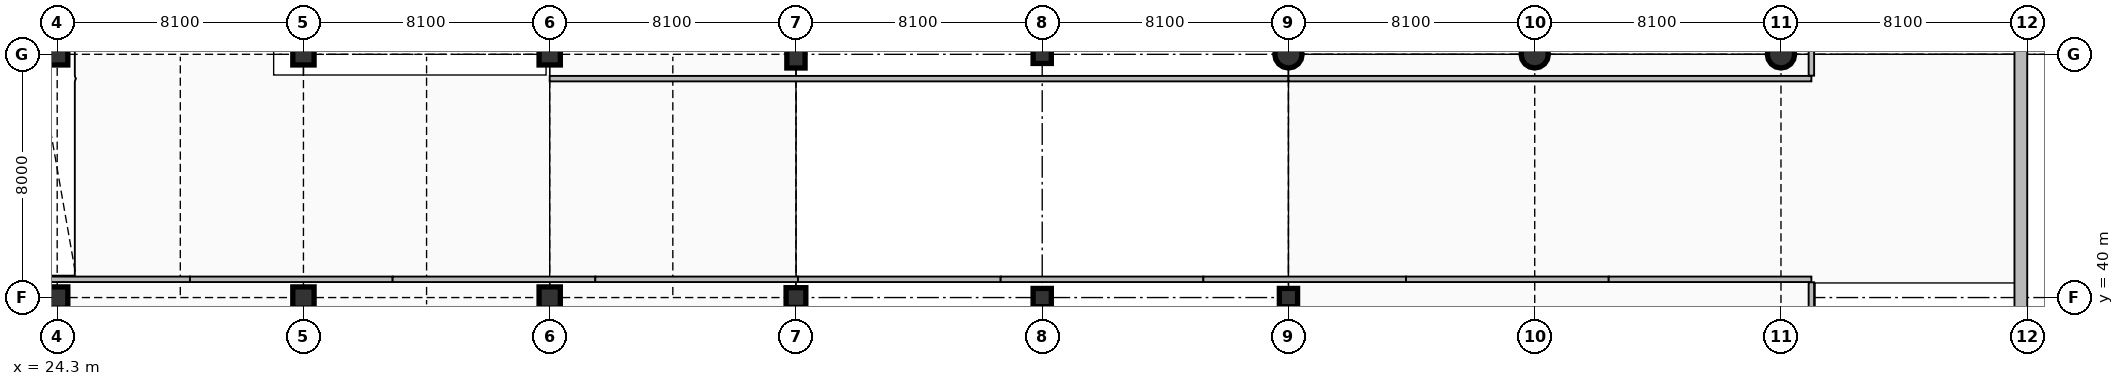
"""IFC4 building model, lengths in metres.
Left out: names, types, materials, properties, quantities, classifications, styles, units other than length and angle.
Written with IfcOpenShell. Run it as: python <this file> out.ifc"""

import sys

from ifc_helpers import new_model, si_unit, direction, frame, frame_2d, origin, origin_2d, place, context, subcontext, project, spatial, rectangle, circle, extrude, element, fill, save


model = new_model("IFC4")
c1 = context("Model", 3, precision=1e-05, world=origin(), true_north=direction((0.0, 1.0)))
c2 = subcontext(c1, "Body", "Model", "MODEL_VIEW")
j1 = project(units=[si_unit("LENGTHUNIT", "METRE"), si_unit("PLANEANGLEUNIT", "RADIAN")], contexts=[c1])
p1 = place(None, origin())
s1 = spatial("IfcSite", under=j1, at=p1, CompositionType="ELEMENT")
p2 = place(p1, origin())
s2 = spatial("IfcBuilding", under=s1, at=p2, CompositionType="ELEMENT")
p3 = place(p2, frame((0.0, 0.0, -4.8)))
s3 = spatial("IfcBuildingStorey", under=s2, at=p3, CompositionType="ELEMENT", Elevation=-4.8)
p4 = place(p3, frame((88.89, 56.0, 0.0), z_axis=(0.0, 0.0, 1.0), x_axis=(0.0, -1.0, 0.0)))
e1 = element("IfcWall", 1, at=p4, inside=s3, PredefinedType="USERDEFINED", context=c2, shape_type="SweptSolid", body=[
    extrude(rectangle(XDim=31.79, YDim=0.42, at=frame_2d((15.895, 0.0))), origin(), (0.0, 0.0, 1.0), 4.45),
])
for number, where, z_axis, x_axis in (
    (2, (24.3, 40.0, 0.0), (0.0, 0.0, 1.0), (1.0, 0.0, 0.0)),
    (3, (24.3, 48.0, 0.0), (0.0, 0.0, 1.0), (1.0, 0.0, 0.0)),
    (4, (32.4, 40.0, 0.0), (0.0, 0.0, 1.0), (1.0, 0.0, 0.0)),
    (5, (32.4, 48.0, 0.0), (0.0, 0.0, 1.0), (1.0, 0.0, 0.0)),
    (6, (40.5, 40.0, 0.0), (0.0, 0.0, 1.0), (1.0, 0.0, 0.0)),
    (7, (40.5, 48.0, 0.0), (0.0, 0.0, 1.0), (1.0, 0.0, 0.0)),
):
    element("IfcColumn", number, at=place(p3, frame(where, z_axis=z_axis, x_axis=x_axis)), inside=s3, PredefinedType="COLUMN", context=c2, shape_type="SweptSolid", body=[
        extrude(rectangle(XDim=0.7, YDim=0.7, at=origin_2d()), origin(), (0.0, 0.0, 1.0), 4.8),
    ])
p5 = place(p3, frame((48.6, 40.0, 0.0), z_axis=(0.0, 0.0, 1.0), x_axis=(1.0, 0.0, 0.0)))
e8 = element("IfcColumn", 8, at=p5, inside=s3, PredefinedType="COLUMN", context=c2, shape_type="SweptSolid", body=[
    extrude(rectangle(XDim=0.65, YDim=0.65, at=origin_2d()), origin(), (0.0, 0.0, 1.0), 4.8),
])
p6 = place(p3, frame((48.6, 48.0, 0.0), z_axis=(0.0, 0.0, 1.0), x_axis=(1.0, 0.0, 0.0)))
e9 = element("IfcColumn", 9, at=p6, inside=s3, PredefinedType="COLUMN", context=c2, shape_type="SweptSolid", body=[
    extrude(rectangle(XDim=0.6, YDim=0.9, at=origin_2d()), origin(), (0.0, 0.0, 1.0), 4.8),
])
for number, where, z_axis, x_axis in (
    (10, (56.7, 40.0, 0.0), (0.0, 0.0, 1.0), (1.0, 0.0, 0.0)),
    (11, (56.7, 48.0, 0.0), (0.0, 0.0, 1.0), (1.0, 0.0, 0.0)),
):
    element("IfcColumn", number, at=place(p3, frame(where, z_axis=z_axis, x_axis=x_axis)), inside=s3, PredefinedType="COLUMN", context=c2, shape_type="SweptSolid", body=[
        extrude(rectangle(XDim=0.6, YDim=0.6, at=origin_2d()), origin(), (0.0, 0.0, 1.0), 4.45),
    ])
p7 = place(p3, frame((64.8, 40.0, 0.0), z_axis=(0.0, 0.0, 1.0), x_axis=(1.0, 0.0, 0.0)))
e12 = element("IfcColumn", 12, at=p7, inside=s3, PredefinedType="COLUMN", context=c2, shape_type="SweptSolid", body=[
    extrude(rectangle(XDim=0.6, YDim=0.6, at=origin_2d()), origin(), (0.0, 0.0, 1.0), 4.8),
])
for number, where, z_axis, x_axis in (
    (13, (64.8, 48.0, 0.0), (0.0, 0.0, 1.0), (1.0, 0.0, 0.0)),
    (14, (72.9, 48.0, 0.0), (0.0, 0.0, 1.0), (1.0, 0.0, 0.0)),
    (15, (81.0, 48.0, 0.0), (0.0, 0.0, 1.0), (1.0, 0.0, 0.0)),
):
    element("IfcColumn", number, at=place(p3, frame(where, z_axis=z_axis, x_axis=x_axis)), inside=s3, PredefinedType="COLUMN", context=c2, shape_type="SweptSolid", body=[
        extrude(circle(Radius=0.45, at=origin_2d()), origin(), (0.0, 0.0, 1.0), 4.8),
    ])
p8 = place(p3, frame((22.0, 40.6, 0.0), z_axis=(0.0, 0.0, 1.0), x_axis=(1.0, 0.0, 0.0)))
e16 = element("IfcWall", 16, at=p8, inside=s3, PredefinedType="PARTITIONING", context=c2, shape_type="SweptSolid", body=[
    extrude(rectangle(XDim=6.667, YDim=0.18, at=frame_2d((3.333, 0.0))), origin(), (0.0, 0.0, 1.0), 4.45),
])
p9 = place(p3, frame((28.667, 40.6, 0.0), z_axis=(0.0, 0.0, 1.0), x_axis=(1.0, 0.0, 0.0)))
e17 = element("IfcWall", 17, at=p9, inside=s3, PredefinedType="PARTITIONING", context=c2, shape_type="SweptSolid", body=[
    extrude(rectangle(XDim=6.667, YDim=0.18, at=frame_2d((3.333, 0.0))), origin(), (0.0, 0.0, 1.0), 4.45),
])
for number, where, z_axis, x_axis in (
    (18, (35.333, 40.6, 0.0), (0.0, 0.0, 1.0), (1.0, 0.0, 0.0)),
    (19, (42.0, 40.6, 0.0), (0.0, 0.0, 1.0), (1.0, 0.0, 0.0)),
):
    element("IfcWall", number, at=place(p3, frame(where, z_axis=z_axis, x_axis=x_axis)), inside=s3, PredefinedType="PARTITIONING", context=c2, shape_type="SweptSolid", body=[
        extrude(rectangle(XDim=6.667, YDim=0.18, at=frame_2d((3.333, 0.0))), origin(), (0.0, 0.0, 1.0), 4.45),
    ])
p10 = place(p3, frame((48.667, 40.6, 0.0), z_axis=(0.0, 0.0, 1.0), x_axis=(1.0, 0.0, 0.0)))
e20 = element("IfcWall", 20, at=p10, inside=s3, PredefinedType="PARTITIONING", context=c2, shape_type="SweptSolid", body=[
    extrude(rectangle(XDim=6.667, YDim=0.18, at=frame_2d((3.333, 0.0))), origin(), (0.0, 0.0, 1.0), 4.45),
])
for number, where, z_axis, x_axis in (
    (21, (55.333, 40.6, 0.0), (0.0, 0.0, 1.0), (1.0, 0.0, 0.0)),
    (22, (62.0, 40.6, 0.0), (0.0, 0.0, 1.0), (1.0, 0.0, 0.0)),
):
    element("IfcWall", number, at=place(p3, frame(where, z_axis=z_axis, x_axis=x_axis)), inside=s3, PredefinedType="PARTITIONING", context=c2, shape_type="SweptSolid", body=[
        extrude(rectangle(XDim=6.667, YDim=0.18, at=frame_2d((3.333, 0.0))), origin(), (0.0, 0.0, 1.0), 4.45),
    ])
p11 = place(p3, frame((68.667, 40.6, 0.0), z_axis=(0.0, 0.0, 1.0), x_axis=(1.0, 0.0, 0.0)))
e23 = element("IfcWall", 23, at=p11, inside=s3, PredefinedType="PARTITIONING", context=c2, shape_type="SweptSolid", body=[
    extrude(rectangle(XDim=6.667, YDim=0.18, at=frame_2d((3.333, 0.0))), origin(), (0.0, 0.0, 1.0), 4.45),
])
p12 = place(p3, frame((75.333, 40.6, 0.0), z_axis=(0.0, 0.0, 1.0), x_axis=(1.0, 0.0, 0.0)))
e24 = element("IfcWall", 24, at=p12, inside=s3, PredefinedType="PARTITIONING", context=c2, shape_type="SweptSolid", body=[
    extrude(rectangle(XDim=6.667, YDim=0.18, at=frame_2d((3.333, 0.0))), origin(), (0.0, 0.0, 1.0), 4.45),
])
p13 = place(p3, frame((40.5, 47.2, 0.0), z_axis=(0.0, 0.0, 1.0), x_axis=(1.0, 0.0, 0.0)))
e25 = element("IfcWall", 25, at=p13, inside=s3, PredefinedType="PARTITIONING", context=c2, shape_type="SweptSolid", body=[
    extrude(rectangle(XDim=24.3, YDim=0.18, at=frame_2d((12.15, 0.0))), origin(), (0.0, 0.0, 1.0), 4.45),
])
p14 = place(p13, frame((11.55, 0.0, 0.0)))
e26 = element("IfcOpeningElement", 26, at=p14, cuts=e25, PredefinedType="OPENING", context=c2, shape_type="SweptSolid", body=[
    extrude(rectangle(XDim=1.2, YDim=2.2, at=frame_2d((0.6, 1.1))), frame((0.0, 0.1, 0.0), z_axis=(0.0, -1.0, 0.0), x_axis=(1.0, 0.0, 0.0)), (0.0, 0.0, 1.0), 0.2),
])
p15 = place(p3, frame((64.8, 47.2, 0.0), z_axis=(0.0, 0.0, 1.0), x_axis=(1.0, 0.0, 0.0)))
e27 = element("IfcWall", 27, at=p15, inside=s3, PredefinedType="PARTITIONING", context=c2, shape_type="SweptSolid", body=[
    extrude(rectangle(XDim=17.2, YDim=0.18, at=frame_2d((8.6, 0.0))), origin(), (0.0, 0.0, 1.0), 4.45),
])
p16 = place(p15, frame((5.248, 0.0, 0.0)))
e28 = element("IfcOpeningElement", 28, at=p16, cuts=e27, PredefinedType="OPENING", context=c2, shape_type="SweptSolid", body=[
    extrude(rectangle(XDim=1.2, YDim=2.2, at=frame_2d((0.6, 1.1))), frame((0.0, 0.1, 0.0), z_axis=(0.0, -1.0, 0.0), x_axis=(1.0, 0.0, 0.0)), (0.0, 0.0, 1.0), 0.2),
])
p17 = place(p3, frame((82.0, 36.728, 0.0), z_axis=(0.0, 0.0, 1.0), x_axis=(0.0, 1.0, 0.0)))
e29 = element("IfcWall", 29, at=p17, inside=s3, PredefinedType="PARTITIONING", context=c2, shape_type="SweptSolid", body=[
    extrude(rectangle(XDim=3.774, YDim=0.18, at=frame_2d((1.887, 0.0))), origin(), (0.0, 0.0, 1.0), 4.45),
])
p18 = place(p3, frame((82.0, 47.298, 0.0), z_axis=(0.0, 0.0, 1.0), x_axis=(0.0, 1.0, 0.0)))
e30 = element("IfcWall", 30, at=p18, inside=s3, PredefinedType="PARTITIONING", context=c2, shape_type="SweptSolid", body=[
    extrude(rectangle(XDim=6.26, YDim=0.18, at=frame_2d((3.13, 0.0))), origin(), (0.0, 0.0, 1.0), 4.45),
])
p19 = place(p14, origin())
e31 = element("IfcDoor", 31, at=p19, inside=s3, OperationType="SINGLE_SWING_RIGHT", PredefinedType="DOOR", context=c2, shape_type="SweptSolid", body=[
    extrude(rectangle(XDim=1.2, YDim=2.2, at=frame_2d((0.6, 1.1))), frame((0.0, 0.025, 0.0), z_axis=(0.0, -1.0, 0.0), x_axis=(1.0, 0.0, 0.0)), (0.0, 0.0, 1.0), 0.05),
])
fill(e26, e31)
p20 = place(p16, origin())
e32 = element("IfcDoor", 32, at=p20, inside=s3, OperationType="SINGLE_SWING_LEFT", PredefinedType="DOOR", context=c2, shape_type="SweptSolid", body=[
    extrude(rectangle(XDim=1.2, YDim=2.2, at=frame_2d((0.6, 1.1))), frame((0.0, 0.025, 0.0), z_axis=(0.0, -1.0, 0.0), x_axis=(1.0, 0.0, 0.0)), (0.0, 0.0, 1.0), 0.05),
])
fill(e28, e32)
save(model, sys.argv[1])
